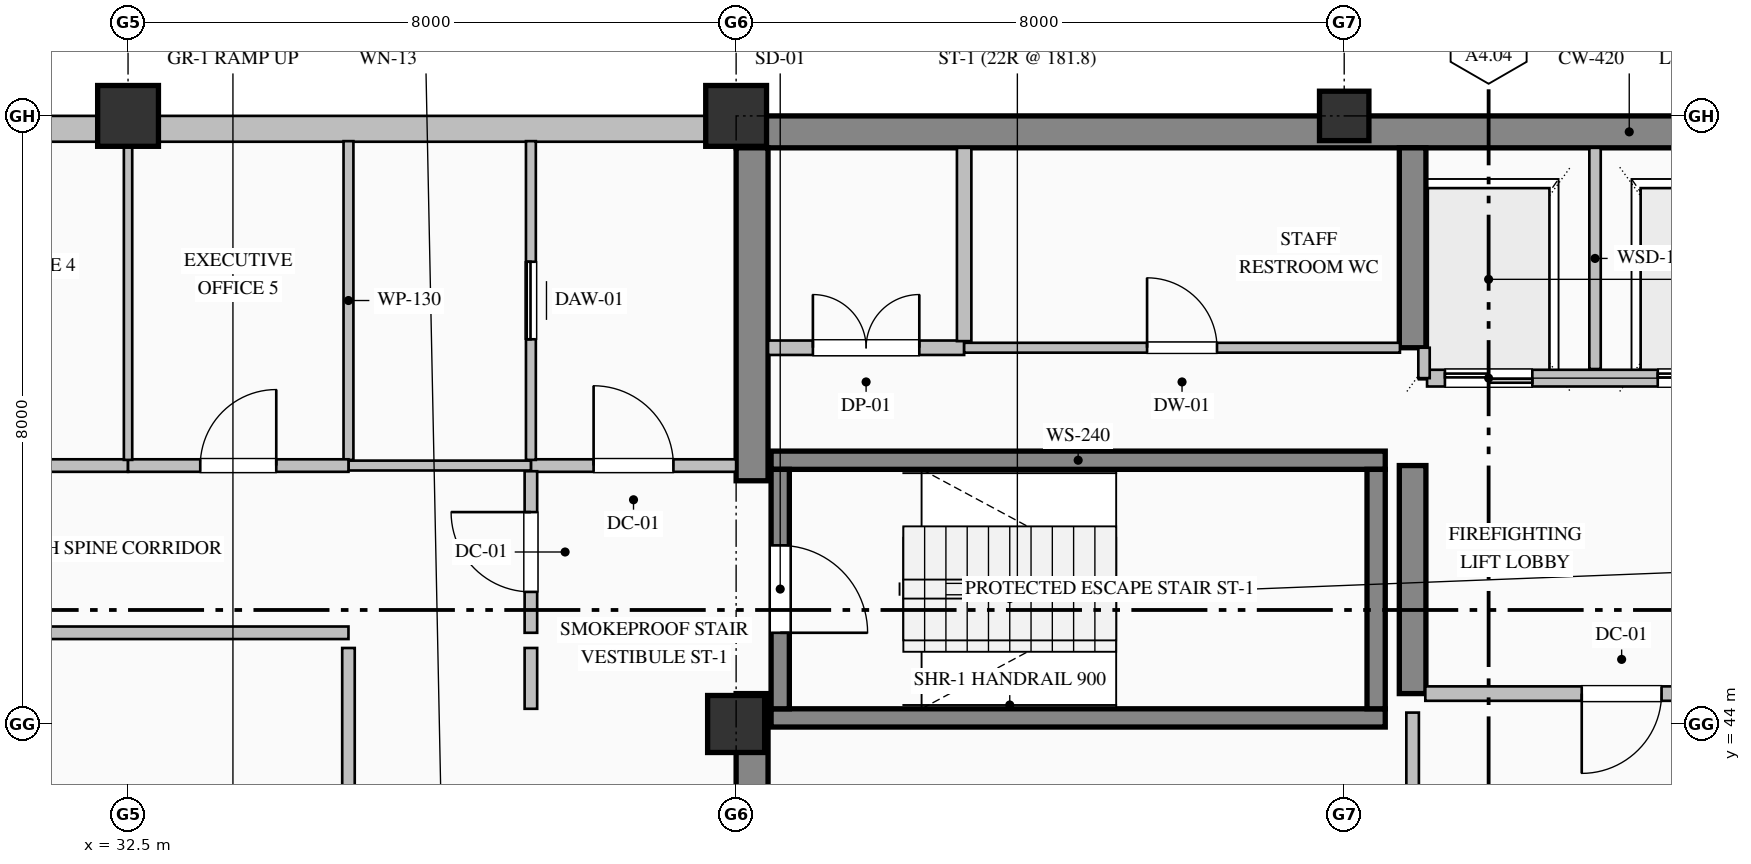
"""IFC4 building model, lengths in metres.
Left out: names, types, materials, properties, quantities, classifications, styles, units other than length and angle.
Written with IfcOpenShell. Run it as: python <this file> out.ifc"""

import sys

from ifc_helpers import new_model, si_unit, direction, frame, frame_2d, origin, origin_2d, place, context, subcontext, project, spatial, rectangle, hollow_rectangle, extrude, element, fill, save


model = new_model("IFC4")
c1 = context("Model", 3, precision=1e-05, world=origin(), true_north=direction((0.0, 1.0)))
c2 = subcontext(c1, "Body", "Model", "MODEL_VIEW")
j1 = project(units=[si_unit("LENGTHUNIT", "METRE"), si_unit("PLANEANGLEUNIT", "RADIAN")], contexts=[c1])
p1 = place(None, origin())
s1 = spatial("IfcSite", under=j1, at=p1, CompositionType="ELEMENT")
p2 = place(p1, origin())
s2 = spatial("IfcBuilding", under=s1, at=p2, CompositionType="ELEMENT")
p3 = place(p2, frame((0.0, 0.0, 295.2)))
s3 = spatial("IfcBuildingStorey", under=s2, at=p3, CompositionType="ELEMENT", Elevation=295.2)
p4 = place(p3, frame((40.5, 51.79, 0.0), z_axis=(0.0, 0.0, 1.0), x_axis=(1.0, 0.0, 0.0)))
e1 = element("IfcWall", 1, at=p4, inside=s3, PredefinedType="SHEAR", context=c2, shape_type="SweptSolid", body=[
    extrude(rectangle(XDim=23.5, YDim=0.42, at=frame_2d((11.75, 0.0))), origin(), (0.0, 0.0, 1.0), 3.785),
])
p5 = place(p3, frame((40.71, 36.42, 0.0), z_axis=(0.0, 0.0, 1.0), x_axis=(0.0, 1.0, 0.0)))
e2 = element("IfcWall", 2, at=p5, inside=s3, PredefinedType="SHEAR", context=c2, shape_type="SweptSolid", body=[
    extrude(rectangle(XDim=7.98, YDim=0.42, at=frame_2d((3.99, 0.0))), origin(), (0.0, 0.0, 1.0), 3.785),
])
p6 = place(p3, frame((40.71, 47.2, 0.0), z_axis=(0.0, 0.0, 1.0), x_axis=(0.0, 1.0, 0.0)))
e3 = element("IfcWall", 3, at=p6, inside=s3, PredefinedType="SHEAR", context=c2, shape_type="SweptSolid", body=[
    extrude(rectangle(XDim=4.38, YDim=0.42, at=frame_2d((2.19, 0.0))), origin(), (0.0, 0.0, 1.0), 3.785),
])
p7 = place(p3, frame((49.4, 44.4, 0.0), z_axis=(0.0, 0.0, 1.0), x_axis=(0.0, 1.0, 0.0)))
e4 = element("IfcWall", 4, at=p7, inside=s3, PredefinedType="SHEAR", context=c2, shape_type="SweptSolid", body=[
    extrude(rectangle(XDim=3.0, YDim=0.35, at=frame_2d((1.5, 0.0))), origin(), (0.0, 0.0, 1.0), 3.785),
])
p8 = place(p3, frame((49.4, 48.95, 0.0), z_axis=(0.0, 0.0, 1.0), x_axis=(0.0, 1.0, 0.0)))
e5 = element("IfcWall", 5, at=p8, inside=s3, PredefinedType="SHEAR", context=c2, shape_type="SweptSolid", body=[
    extrude(rectangle(XDim=2.63, YDim=0.35, at=frame_2d((1.315, 0.0))), origin(), (0.0, 0.0, 1.0), 3.785),
])
p9 = place(p3, frame((32.5, 52.0, 0.0), z_axis=(0.0, 0.0, 1.0), x_axis=(1.0, 0.0, 0.0)))
e6 = element("IfcColumn", 6, at=p9, inside=s3, PredefinedType="COLUMN", context=c2, shape_type="SweptSolid", body=[
    extrude(hollow_rectangle(XDim=0.8, YDim=0.8, WallThickness=0.032, at=origin_2d()), origin(), (0.0, 0.0, 1.0), 4.0),
])
p10 = place(p3, frame((40.5, 44.0, 0.0), z_axis=(0.0, 0.0, 1.0), x_axis=(1.0, 0.0, 0.0)))
e7 = element("IfcColumn", 7, at=p10, inside=s3, PredefinedType="COLUMN", context=c2, shape_type="SweptSolid", body=[
    extrude(rectangle(XDim=0.75, YDim=0.75, at=origin_2d()), origin(), (0.0, 0.0, 1.0), 4.0),
])
p11 = place(p3, frame((40.5, 52.0, 0.0), z_axis=(0.0, 0.0, 1.0), x_axis=(1.0, 0.0, 0.0)))
e8 = element("IfcColumn", 8, at=p11, inside=s3, PredefinedType="COLUMN", context=c2, shape_type="SweptSolid", body=[
    extrude(hollow_rectangle(XDim=0.8, YDim=0.8, WallThickness=0.032, at=origin_2d()), origin(), (0.0, 0.0, 1.0), 4.0),
])
p12 = place(p3, frame((48.5, 52.0, 0.0), z_axis=(0.0, 0.0, 1.0), x_axis=(1.0, 0.0, 0.0)))
e9 = element("IfcColumn", 9, at=p12, inside=s3, PredefinedType="COLUMN", context=c2, shape_type="SweptSolid", body=[
    extrude(hollow_rectangle(XDim=0.65, YDim=0.65, WallThickness=0.028, at=origin_2d()), origin(), (0.0, 0.0, 1.0), 4.0),
])
p13 = place(p3, frame((20.5, 51.83, 0.0), z_axis=(0.0, 0.0, 1.0), x_axis=(1.0, 0.0, 0.0)))
e10 = element("IfcWall", 10, at=p13, inside=s3, PredefinedType="SOLIDWALL", context=c2, shape_type="SweptSolid", body=[
    extrude(rectangle(XDim=20.02, YDim=0.34, at=frame_2d((10.01, 0.0))), origin(), (0.0, 0.0, 1.0), 3.335),
])
for number, where, z_axis, x_axis in (
    (11, (40.96, 47.47, 0.0), (0.0, 0.0, 1.0), (1.0, 0.0, 0.0)),
    (12, (49.04, 44.08, 0.0), (0.0, 0.0, 1.0), (-1.0, 0.0, 0.0)),
):
    element("IfcWall", number, at=place(p3, frame(where, z_axis=z_axis, x_axis=x_axis)), inside=s3, PredefinedType="SOLIDWALL", context=c2, shape_type="SweptSolid", body=[
        extrude(rectangle(XDim=8.08, YDim=0.24, at=frame_2d((4.04, 0.0))), origin(), (0.0, 0.0, 1.0), 4.0),
    ])
p14 = place(p3, frame((41.08, 47.35, 0.0), z_axis=(0.0, 0.0, 1.0), x_axis=(0.0, -1.0, 0.0)))
e13 = element("IfcWall", 13, at=p14, inside=s3, PredefinedType="SOLIDWALL", context=c2, shape_type="SweptSolid", body=[
    extrude(rectangle(XDim=3.15, YDim=0.24, at=frame_2d((1.575, 0.0))), origin(), (0.0, 0.0, 1.0), 4.0),
])
p15 = place(p14, frame((1.0, 0.0, 0.0)))
e14 = element("IfcOpeningElement", 14, at=p15, cuts=e13, PredefinedType="OPENING", context=c2, shape_type="SweptSolid", body=[
    extrude(rectangle(XDim=1.15, YDim=2.2, at=frame_2d((0.575, 1.1))), frame((0.0, 0.13, 0.0), z_axis=(0.0, -1.0, 0.0), x_axis=(1.0, 0.0, 0.0)), (0.0, 0.0, 1.0), 0.26),
])
p16 = place(p3, frame((48.92, 44.2, 0.0), z_axis=(0.0, 0.0, 1.0), x_axis=(0.0, 1.0, 0.0)))
e15 = element("IfcWall", 15, at=p16, inside=s3, PredefinedType="SOLIDWALL", context=c2, shape_type="SweptSolid", body=[
    extrude(rectangle(XDim=3.15, YDim=0.24, at=frame_2d((1.575, 0.0))), origin(), (0.0, 0.0, 1.0), 4.0),
])
p17 = place(p3, frame((54.71, 48.55, 0.0), z_axis=(0.0, 0.0, 1.0), x_axis=(-1.0, 0.0, 0.0)))
e16 = element("IfcWall", 16, at=p17, inside=s3, PredefinedType="PARTITIONING", context=c2, shape_type="SweptSolid", body=[
    extrude(rectangle(XDim=5.12, YDim=0.22, at=frame_2d((2.56, 0.0))), origin(), (0.0, 0.0, 1.0), 3.785),
])
p18 = place(p17, frame((3.735, 0.0, 0.0)))
e17 = element("IfcOpeningElement", 17, at=p18, cuts=e16, PredefinedType="OPENING", context=c2, shape_type="SweptSolid", body=[
    extrude(rectangle(XDim=1.15, YDim=2.2, at=frame_2d((0.575, 1.1))), frame((0.0, 0.12, 0.0), z_axis=(0.0, -1.0, 0.0), x_axis=(1.0, 0.0, 0.0)), (0.0, 0.0, 1.0), 0.24),
])
p19 = place(p17, frame((0.935, 0.0, 0.0)))
e18 = element("IfcOpeningElement", 18, at=p19, cuts=e16, PredefinedType="OPENING", context=c2, shape_type="SweptSolid", body=[
    extrude(rectangle(XDim=1.15, YDim=2.2, at=frame_2d((0.575, 1.1))), frame((0.0, 0.12, 0.0), z_axis=(0.0, -1.0, 0.0), x_axis=(1.0, 0.0, 0.0)), (0.0, 0.0, 1.0), 0.24),
])
p20 = place(p3, frame((51.8, 48.67, 0.0), z_axis=(0.0, 0.0, 1.0), x_axis=(0.0, 1.0, 0.0)))
e19 = element("IfcWall", 19, at=p20, inside=s3, PredefinedType="PARTITIONING", context=c2, shape_type="SweptSolid", body=[
    extrude(rectangle(XDim=2.91, YDim=0.15, at=frame_2d((1.455, 0.0))), origin(), (0.0, 0.0, 1.0), 3.785),
])
p21 = place(p3, frame((49.55, 48.55, 0.0), z_axis=(0.0, 0.0, 1.0), x_axis=(0.0, 1.0, 0.0)))
e20 = element("IfcWall", 20, at=p21, inside=s3, PredefinedType="PARTITIONING", context=c2, shape_type="SweptSolid", body=[
    extrude(rectangle(XDim=0.4, YDim=0.15, at=frame_2d((0.2, 0.0))), origin(), (0.0, 0.0, 1.0), 3.785),
])
p22 = place(p3, frame((37.8, 47.4, 0.0), z_axis=(0.0, 0.0, 1.0), x_axis=(1.0, 0.0, 0.0)))
e21 = element("IfcWall", 21, at=p22, inside=s3, PredefinedType="PARTITIONING", context=c2, shape_type="SweptSolid", body=[
    extrude(rectangle(XDim=2.7, YDim=0.165, at=frame_2d((1.35, 0.0))), origin(), (0.0, 0.0, 1.0), 3.785),
])
p23 = place(p22, frame((0.825, 0.0, 0.0)))
e22 = element("IfcOpeningElement", 22, at=p23, cuts=e21, PredefinedType="OPENING", context=c2, shape_type="SweptSolid", body=[
    extrude(rectangle(XDim=1.05, YDim=2.15, at=frame_2d((0.525, 1.075))), frame((0.0, 0.093, 0.0), z_axis=(0.0, -1.0, 0.0), x_axis=(1.0, 0.0, 0.0)), (0.0, 0.0, 1.0), 0.185),
])
p24 = place(p3, frame((37.8, 45.2, 0.0), z_axis=(0.0, 0.0, 1.0), x_axis=(0.0, 1.0, 0.0)))
e23 = element("IfcWall", 23, at=p24, inside=s3, PredefinedType="PARTITIONING", context=c2, shape_type="SweptSolid", body=[
    extrude(rectangle(XDim=2.125, YDim=0.165, at=frame_2d((1.063, 0.0))), origin(), (0.0, 0.0, 1.0), 3.785),
])
p25 = place(p24, frame((0.538, 0.0, 0.0)))
e24 = element("IfcOpeningElement", 24, at=p25, cuts=e23, PredefinedType="OPENING", context=c2, shape_type="SweptSolid", body=[
    extrude(rectangle(XDim=1.05, YDim=2.15, at=frame_2d((0.525, 1.075))), frame((0.0, 0.093, 0.0), z_axis=(0.0, -1.0, 0.0), x_axis=(1.0, 0.0, 0.0)), (0.0, 0.0, 1.0), 0.185),
])
p26 = place(p3, frame((37.8, 44.2, 0.0), z_axis=(0.0, 0.0, 1.0), x_axis=(0.0, 1.0, 0.0)))
e25 = element("IfcWall", 25, at=p26, inside=s3, PredefinedType="PARTITIONING", context=c2, shape_type="SweptSolid", body=[
    extrude(rectangle(XDim=0.8, YDim=0.165, at=frame_2d((0.4, 0.0))), origin(), (0.0, 0.0, 1.0), 3.785),
])
p27 = place(p3, frame((37.8, 47.475, 0.0), z_axis=(0.0, 0.0, 1.0), x_axis=(0.0, 1.0, 0.0)))
e26 = element("IfcWall", 26, at=p27, inside=s3, PredefinedType="PARTITIONING", context=c2, shape_type="SweptSolid", body=[
    extrude(rectangle(XDim=4.193, YDim=0.13, at=frame_2d((2.097, 0.0))), origin(), (0.0, 0.0, 1.0), 3.785),
])
p28 = place(p27, frame((1.587, 0.0, 0.0)))
e27 = element("IfcOpeningElement", 27, at=p28, cuts=e26, PredefinedType="OPENING", context=c2, shape_type="SweptSolid", body=[
    extrude(rectangle(XDim=1.02, YDim=2.15, at=frame_2d((0.51, 1.075))), frame((0.0, 0.075, 0.0), z_axis=(0.0, -1.0, 0.0), x_axis=(1.0, 0.0, 0.0)), (0.0, 0.0, 1.0), 0.15),
])
p29 = place(p3, frame((37.8, 47.4, 0.0), z_axis=(0.0, 0.0, 1.0), x_axis=(-1.0, 0.0, 0.0)))
e28 = element("IfcWall", 28, at=p29, inside=s3, PredefinedType="PARTITIONING", context=c2, shape_type="SweptSolid", body=[
    extrude(rectangle(XDim=2.4, YDim=0.13, at=frame_2d((1.2, 0.0))), origin(), (0.0, 0.0, 1.0), 3.785),
])
p30 = place(p3, frame((35.4, 47.475, 0.0), z_axis=(0.0, 0.0, 1.0), x_axis=(0.0, 1.0, 0.0)))
e29 = element("IfcWall", 29, at=p30, inside=s3, PredefinedType="PARTITIONING", context=c2, shape_type="SweptSolid", body=[
    extrude(rectangle(XDim=4.193, YDim=0.13, at=frame_2d((2.097, 0.0))), origin(), (0.0, 0.0, 1.0), 3.785),
])
p31 = place(p3, frame((40.92, 48.95, 0.0), z_axis=(0.0, 0.0, 1.0), x_axis=(1.0, 0.0, 0.0)))
e30 = element("IfcWall", 30, at=p31, inside=s3, PredefinedType="PARTITIONING", context=c2, shape_type="SweptSolid", body=[
    extrude(rectangle(XDim=2.58, YDim=0.19, at=frame_2d((1.29, 0.0))), origin(), (0.0, 0.0, 1.0), 3.785),
])
p32 = place(p31, frame((0.59, 0.0, 0.0)))
e31 = element("IfcOpeningElement", 31, at=p32, cuts=e30, PredefinedType="OPENING", context=c2, shape_type="SweptSolid", body=[
    extrude(rectangle(XDim=1.4, YDim=2.25, at=frame_2d((0.7, 1.125))), frame((0.0, 0.105, 0.0), z_axis=(0.0, -1.0, 0.0), x_axis=(1.0, 0.0, 0.0)), (0.0, 0.0, 1.0), 0.21),
])
p33 = place(p3, frame((43.5, 48.95, 0.0), z_axis=(0.0, 0.0, 1.0), x_axis=(1.0, 0.0, 0.0)))
e32 = element("IfcWall", 32, at=p33, inside=s3, PredefinedType="PARTITIONING", context=c2, shape_type="SweptSolid", body=[
    extrude(rectangle(XDim=5.733, YDim=0.13, at=frame_2d((2.866, 0.0))), origin(), (0.0, 0.0, 1.0), 3.785),
])
p34 = place(p33, frame((2.406, 0.0, 0.0)))
e33 = element("IfcOpeningElement", 33, at=p34, cuts=e32, PredefinedType="OPENING", context=c2, shape_type="SweptSolid", body=[
    extrude(rectangle(XDim=0.92, YDim=2.15, at=frame_2d((0.46, 1.075))), frame((0.0, 0.075, 0.0), z_axis=(0.0, -1.0, 0.0), x_axis=(1.0, 0.0, 0.0)), (0.0, 0.0, 1.0), 0.15),
])
p35 = place(p3, frame((54.733, 44.4, 0.0), z_axis=(0.0, 0.0, 1.0), x_axis=(-1.0, 0.0, 0.0)))
e34 = element("IfcWall", 34, at=p35, inside=s3, PredefinedType="PARTITIONING", context=c2, shape_type="SweptSolid", body=[
    extrude(rectangle(XDim=5.166, YDim=0.19, at=frame_2d((2.583, 0.0))), origin(), (0.0, 0.0, 1.0), 3.785),
])
p36 = place(p35, frame((2.058, 0.0, 0.0)))
e35 = element("IfcOpeningElement", 35, at=p36, cuts=e34, PredefinedType="OPENING", context=c2, shape_type="SweptSolid", body=[
    extrude(rectangle(XDim=1.05, YDim=2.15, at=frame_2d((0.525, 1.075))), frame((0.0, 0.105, 0.0), z_axis=(0.0, -1.0, 0.0), x_axis=(1.0, 0.0, 0.0)), (0.0, 0.0, 1.0), 0.21),
])
p37 = place(p3, frame((49.4, 39.647, 0.0), z_axis=(0.0, 0.0, 1.0), x_axis=(0.0, 1.0, 0.0)))
e36 = element("IfcWall", 36, at=p37, inside=s3, PredefinedType="PARTITIONING", context=c2, shape_type="SweptSolid", body=[
    extrude(rectangle(XDim=4.503, YDim=0.165, at=frame_2d((2.251, 0.0))), origin(), (0.0, 0.0, 1.0), 3.027),
])
p38 = place(p37, frame((1.802, 0.0, 0.0)))
e37 = element("IfcOpeningElement", 37, at=p38, cuts=e36, PredefinedType="OPENING", context=c2, shape_type="SweptSolid", body=[
    extrude(rectangle(XDim=0.9, YDim=2.15, at=frame_2d((0.45, 1.075))), frame((0.0, 0.093, 0.0), z_axis=(0.0, -1.0, 0.0), x_axis=(1.0, 0.0, 0.0)), (0.0, 0.0, 1.0), 0.185),
])
p39 = place(p3, frame((43.5, 51.58, 0.0), z_axis=(0.0, 0.0, 1.0), x_axis=(0.0, -1.0, 0.0)))
e38 = element("IfcWall", 38, at=p39, inside=s3, PredefinedType="PARTITIONING", context=c2, shape_type="SweptSolid", body=[
    extrude(rectangle(XDim=2.543, YDim=0.19, at=frame_2d((1.271, 0.0))), origin(), (0.0, 0.0, 1.0), 3.785),
])
p40 = place(p3, frame((35.4, 45.2, 0.0), z_axis=(0.0, 0.0, 1.0), x_axis=(-1.0, 0.0, 0.0)))
e39 = element("IfcWall", 39, at=p40, inside=s3, PredefinedType="PARTITIONING", context=c2, shape_type="SweptSolid", body=[
    extrude(rectangle(XDim=14.9, YDim=0.165, at=frame_2d((7.45, 0.0))), origin(), (0.0, 0.0, 1.0), 3.785),
])
p41 = place(p40, frame((6.95, 0.0, 0.0)))
e40 = element("IfcOpeningElement", 40, at=p41, cuts=e39, PredefinedType="OPENING", context=c2, shape_type="SweptSolid", body=[
    extrude(rectangle(XDim=1.0, YDim=2.15, at=frame_2d((0.5, 1.075))), frame((0.0, 0.093, 0.0), z_axis=(0.0, -1.0, 0.0), x_axis=(1.0, 0.0, 0.0)), (0.0, 0.0, 1.0), 0.185),
])
p42 = place(p3, frame((26.8, 47.4, 0.0), z_axis=(0.0, 0.0, 1.0), x_axis=(1.0, 0.0, 0.0)))
e41 = element("IfcWall", 41, at=p42, inside=s3, PredefinedType="PARTITIONING", context=c2, shape_type="SweptSolid", body=[
    extrude(rectangle(XDim=5.7, YDim=0.165, at=frame_2d((2.85, 0.0))), origin(), (0.0, 0.0, 1.0), 3.785),
])
p43 = place(p42, frame((2.35, 0.0, 0.0)))
e42 = element("IfcOpeningElement", 42, at=p43, cuts=e41, PredefinedType="OPENING", context=c2, shape_type="SweptSolid", body=[
    extrude(rectangle(XDim=1.0, YDim=2.15, at=frame_2d((0.5, 1.075))), frame((0.0, 0.093, 0.0), z_axis=(0.0, -1.0, 0.0), x_axis=(1.0, 0.0, 0.0)), (0.0, 0.0, 1.0), 0.185),
])
p44 = place(p3, frame((32.5, 47.4, 0.0), z_axis=(0.0, 0.0, 1.0), x_axis=(1.0, 0.0, 0.0)))
e43 = element("IfcWall", 43, at=p44, inside=s3, PredefinedType="PARTITIONING", context=c2, shape_type="SweptSolid", body=[
    extrude(rectangle(XDim=2.9, YDim=0.165, at=frame_2d((1.45, 0.0))), origin(), (0.0, 0.0, 1.0), 3.785),
])
p45 = place(p44, frame((0.95, 0.0, 0.0)))
e44 = element("IfcOpeningElement", 44, at=p45, cuts=e43, PredefinedType="OPENING", context=c2, shape_type="SweptSolid", body=[
    extrude(rectangle(XDim=1.0, YDim=2.15, at=frame_2d((0.5, 1.075))), frame((0.0, 0.093, 0.0), z_axis=(0.0, -1.0, 0.0), x_axis=(1.0, 0.0, 0.0)), (0.0, 0.0, 1.0), 0.185),
])
p46 = place(p3, frame((35.4, 33.6, 0.0), z_axis=(0.0, 0.0, 1.0), x_axis=(0.0, 1.0, 0.0)))
e45 = element("IfcWall", 45, at=p46, inside=s3, PredefinedType="PARTITIONING", context=c2, shape_type="SweptSolid", body=[
    extrude(rectangle(XDim=11.4, YDim=0.165, at=frame_2d((5.7, 0.0))), origin(), (0.0, 0.0, 1.0), 3.785),
])
p47 = place(p3, frame((32.5, 51.668, 0.0), z_axis=(0.0, 0.0, 1.0), x_axis=(0.0, -1.0, 0.0)))
e46 = element("IfcWall", 46, at=p47, inside=s3, PredefinedType="MOVABLE", context=c2, shape_type="SweptSolid", body=[
    extrude(rectangle(XDim=4.193, YDim=0.11, at=frame_2d((2.097, 0.0))), origin(), (0.0, 0.0, 1.0), 3.785),
])
p48 = place(p15, origin())
e47 = element("IfcDoor", 47, at=p48, inside=s3, OperationType="SINGLE_SWING_RIGHT", PredefinedType="DOOR", context=c2, shape_type="SweptSolid", body=[
    extrude(rectangle(XDim=1.15, YDim=2.2, at=frame_2d((0.575, 1.1))), frame((0.0, 0.025, 0.0), z_axis=(0.0, -1.0, 0.0), x_axis=(1.0, 0.0, 0.0)), (0.0, 0.0, 1.0), 0.05),
])
fill(e14, e47)
p49 = place(p18, origin())
e48 = element("IfcDoor", 48, at=p49, inside=s3, OperationType="DOUBLE_DOOR_SLIDING", PredefinedType="DOOR", context=c2, shape_type="SweptSolid", body=[
    extrude(rectangle(XDim=1.15, YDim=2.2, at=frame_2d((0.575, 1.1))), frame((0.0, 0.025, 0.0), z_axis=(0.0, -1.0, 0.0), x_axis=(1.0, 0.0, 0.0)), (0.0, 0.0, 1.0), 0.05),
])
fill(e17, e48)
p50 = place(p19, origin())
e49 = element("IfcDoor", 49, at=p50, inside=s3, OperationType="DOUBLE_DOOR_SLIDING", PredefinedType="DOOR", context=c2, shape_type="SweptSolid", body=[
    extrude(rectangle(XDim=1.15, YDim=2.2, at=frame_2d((0.575, 1.1))), frame((0.0, 0.025, 0.0), z_axis=(0.0, -1.0, 0.0), x_axis=(1.0, 0.0, 0.0)), (0.0, 0.0, 1.0), 0.05),
])
fill(e18, e49)
p51 = place(p36, origin())
e50 = element("IfcDoor", 50, at=p51, inside=s3, OperationType="SINGLE_SWING_RIGHT", PredefinedType="DOOR", context=c2, shape_type="SweptSolid", body=[
    extrude(rectangle(XDim=1.05, YDim=2.15, at=frame_2d((0.525, 1.075))), frame((0.0, 0.025, 0.0), z_axis=(0.0, -1.0, 0.0), x_axis=(1.0, 0.0, 0.0)), (0.0, 0.0, 1.0), 0.05),
])
fill(e35, e50)
p52 = place(p23, origin())
e51 = element("IfcDoor", 51, at=p52, inside=s3, OperationType="SINGLE_SWING_LEFT", PredefinedType="DOOR", context=c2, shape_type="SweptSolid", body=[
    extrude(rectangle(XDim=1.05, YDim=2.15, at=frame_2d((0.525, 1.075))), frame((0.0, 0.025, 0.0), z_axis=(0.0, -1.0, 0.0), x_axis=(1.0, 0.0, 0.0)), (0.0, 0.0, 1.0), 0.05),
])
fill(e22, e51)
p53 = place(p25, origin())
e52 = element("IfcDoor", 52, at=p53, inside=s3, OperationType="SINGLE_SWING_RIGHT", PredefinedType="DOOR", context=c2, shape_type="SweptSolid", body=[
    extrude(rectangle(XDim=1.05, YDim=2.15, at=frame_2d((0.525, 1.075))), frame((0.0, 0.025, 0.0), z_axis=(0.0, -1.0, 0.0), x_axis=(1.0, 0.0, 0.0)), (0.0, 0.0, 1.0), 0.05),
])
fill(e24, e52)
p54 = place(p28, origin())
e53 = element("IfcDoor", 53, at=p54, inside=s3, OperationType="SLIDING_TO_LEFT", PredefinedType="DOOR", context=c2, shape_type="SweptSolid", body=[
    extrude(rectangle(XDim=1.02, YDim=2.15, at=frame_2d((0.51, 1.075))), frame((0.0, 0.025, 0.0), z_axis=(0.0, -1.0, 0.0), x_axis=(1.0, 0.0, 0.0)), (0.0, 0.0, 1.0), 0.05),
])
fill(e27, e53)
p55 = place(p32, origin())
e54 = element("IfcDoor", 54, at=p55, inside=s3, OperationType="DOUBLE_DOOR_SINGLE_SWING", PredefinedType="DOOR", context=c2, shape_type="SweptSolid", body=[
    extrude(rectangle(XDim=1.4, YDim=2.25, at=frame_2d((0.7, 1.125))), frame((0.0, 0.025, 0.0), z_axis=(0.0, -1.0, 0.0), x_axis=(1.0, 0.0, 0.0)), (0.0, 0.0, 1.0), 0.05),
])
fill(e31, e54)
p56 = place(p34, origin())
e55 = element("IfcDoor", 55, at=p56, inside=s3, OperationType="SINGLE_SWING_LEFT", PredefinedType="DOOR", context=c2, shape_type="SweptSolid", body=[
    extrude(rectangle(XDim=0.92, YDim=2.15, at=frame_2d((0.46, 1.075))), frame((0.0, 0.025, 0.0), z_axis=(0.0, -1.0, 0.0), x_axis=(1.0, 0.0, 0.0)), (0.0, 0.0, 1.0), 0.05),
])
fill(e33, e55)
p57 = place(p45, origin())
e56 = element("IfcDoor", 56, at=p57, inside=s3, OperationType="SINGLE_SWING_RIGHT", PredefinedType="DOOR", context=c2, shape_type="SweptSolid", body=[
    extrude(rectangle(XDim=1.0, YDim=2.15, at=frame_2d((0.5, 1.075))), frame((0.0, 0.025, 0.0), z_axis=(0.0, -1.0, 0.0), x_axis=(1.0, 0.0, 0.0)), (0.0, 0.0, 1.0), 0.05),
])
fill(e44, e56)
save(model, sys.argv[1])
